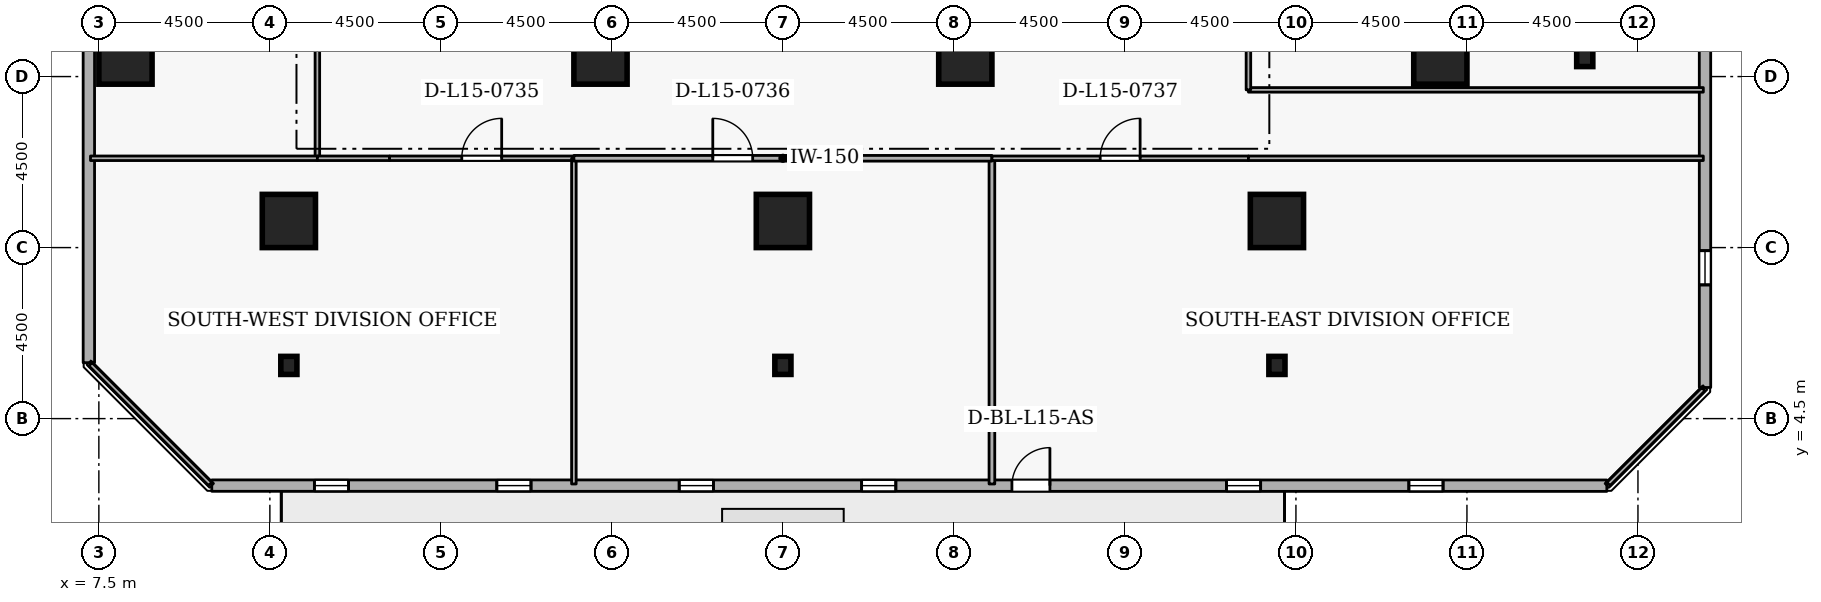
"""IFC4 building model, lengths in metres.
Left out: names, types, materials, properties, quantities, classifications, styles, units other than length and angle.
Written with IfcOpenShell. Run it as: python <this file> out.ifc"""

import sys

from ifc_helpers import new_model, si_unit, direction, frame, frame_2d, origin, origin_2d, place, context, subcontext, project, spatial, rectangle, i_section, extrude, element, fill, save


model = new_model("IFC4")
c1 = context("Model", 3, precision=1e-05, world=origin(), true_north=direction((0.0, 1.0)))
c2 = subcontext(c1, "Body", "Model", "MODEL_VIEW")
j1 = project(units=[si_unit("LENGTHUNIT", "METRE"), si_unit("PLANEANGLEUNIT", "RADIAN")], contexts=[c1])
p1 = place(None, origin())
s1 = spatial("IfcSite", under=j1, at=p1, CompositionType="ELEMENT")
p2 = place(p1, origin())
s2 = spatial("IfcBuilding", under=s1, at=p2, CompositionType="ELEMENT")
p3 = place(p2, frame((0.0, 0.0, 60.9)))
s3 = spatial("IfcBuildingStorey", under=s2, at=p3, CompositionType="ELEMENT", Elevation=60.9)
for number, where, z_axis, x_axis in (
    (1, (12.5, 9.7, 0.0), (0.0, 0.0, 1.0), (1.0, 0.0, 0.0)),
    (2, (25.5, 9.7, 0.0), (0.0, 0.0, 1.0), (1.0, 0.0, 0.0)),
    (3, (38.5, 9.7, 0.0), (0.0, 0.0, 1.0), (1.0, 0.0, 0.0)),
    (4, (42.8, 14.0, 0.0), (0.0, 0.0, 1.0), (1.0, 0.0, 0.0)),
    (5, (8.2, 14.0, 0.0), (0.0, 0.0, 1.0), (1.0, 0.0, 0.0)),
    (6, (20.7, 14.0, 0.0), (0.0, 0.0, 1.0), (1.0, 0.0, 0.0)),
    (7, (30.3, 14.0, 0.0), (0.0, 0.0, 1.0), (1.0, 0.0, 0.0)),
):
    element("IfcColumn", number, at=place(p3, frame(where, z_axis=z_axis, x_axis=x_axis)), inside=s3, PredefinedType="COLUMN", context=c2, shape_type="SweptSolid", body=[
        extrude(rectangle(XDim=1.4, YDim=1.4, at=origin_2d()), origin(), (0.0, 0.0, 1.0), 3.6),
    ])
for number, where, z_axis, x_axis in (
    (8, (12.5, 5.9, 0.0), (0.0, 0.0, 1.0), (1.0, 0.0, 0.0)),
    (9, (25.5, 5.9, 0.0), (0.0, 0.0, 1.0), (1.0, 0.0, 0.0)),
    (10, (38.5, 5.9, 0.0), (0.0, 0.0, 1.0), (1.0, 0.0, 0.0)),
    (11, (46.6, 14.0, 0.0), (0.0, 0.0, 1.0), (1.0, 0.0, 0.0)),
):
    element("IfcColumn", number, at=place(p3, frame(where, z_axis=z_axis, x_axis=x_axis)), inside=s3, PredefinedType="COLUMN", context=c2, shape_type="SweptSolid", body=[
        extrude(i_section(OverallWidth=0.424, OverallDepth=0.475, WebThickness=0.048, FlangeThickness=0.077, FilletRadius=0.015, at=origin_2d()), origin(), (0.0, 0.0, 1.0), 3.6),
    ])
p4 = place(p3, frame((10.471, 2.737, 0.0), z_axis=(0.0, 0.0, 1.0), x_axis=(0.999999998209, -5.985515e-05, 0.0)))
e12 = element("IfcWall", 12, at=p4, inside=s3, PredefinedType="STANDARD", context=c2, shape_type="SweptSolid", body=[
    extrude(rectangle(XDim=36.71, YDim=0.3, at=frame_2d((18.355, 0.0))), origin(), (0.0, 0.0, 1.0), 2.7),
])
p5 = place(p4, frame((21.055, 0.0, 0.0)))
e13 = element("IfcOpeningElement", 13, at=p5, cuts=e12, PredefinedType="OPENING", context=c2, shape_type="SweptSolid", body=[
    extrude(rectangle(XDim=1.0, YDim=2.08, at=frame_2d((0.5, 1.04))), frame((0.0, 0.16, 0.0), z_axis=(0.0, -1.0, 0.0), x_axis=(1.0, 0.0, 0.0)), (0.0, 0.0, 1.0), 0.32),
])
p6 = place(p4, frame((2.7, 0.0, 0.72)))
e14 = element("IfcOpeningElement", 14, at=p6, cuts=e12, PredefinedType="OPENING", context=c2, shape_type="SweptSolid", body=[
    extrude(rectangle(XDim=0.9, YDim=1.75, at=frame_2d((0.45, 0.875))), frame((0.0, 0.16, 0.0), z_axis=(0.0, -1.0, 0.0), x_axis=(1.0, 0.0, 0.0)), (0.0, 0.0, 1.0), 0.32),
])
p7 = place(p4, frame((7.5, 0.0, 0.72)))
e15 = element("IfcOpeningElement", 15, at=p7, cuts=e12, PredefinedType="OPENING", context=c2, shape_type="SweptSolid", body=[
    extrude(rectangle(XDim=0.9, YDim=1.75, at=frame_2d((0.45, 0.875))), frame((0.0, 0.16, 0.0), z_axis=(0.0, -1.0, 0.0), x_axis=(1.0, 0.0, 0.0)), (0.0, 0.0, 1.0), 0.32),
])
p8 = place(p4, frame((12.3, 0.0, 0.72)))
e16 = element("IfcOpeningElement", 16, at=p8, cuts=e12, PredefinedType="OPENING", context=c2, shape_type="SweptSolid", body=[
    extrude(rectangle(XDim=0.9, YDim=1.75, at=frame_2d((0.45, 0.875))), frame((0.0, 0.16, 0.0), z_axis=(0.0, -1.0, 0.0), x_axis=(1.0, 0.0, 0.0)), (0.0, 0.0, 1.0), 0.32),
])
p9 = place(p4, frame((17.1, 0.0, 0.72)))
e17 = element("IfcOpeningElement", 17, at=p9, cuts=e12, PredefinedType="OPENING", context=c2, shape_type="SweptSolid", body=[
    extrude(rectangle(XDim=0.9, YDim=1.75, at=frame_2d((0.45, 0.875))), frame((0.0, 0.16, 0.0), z_axis=(0.0, -1.0, 0.0), x_axis=(1.0, 0.0, 0.0)), (0.0, 0.0, 1.0), 0.32),
])
p10 = place(p4, frame((26.7, 0.0, 0.72)))
e18 = element("IfcOpeningElement", 18, at=p10, cuts=e12, PredefinedType="OPENING", context=c2, shape_type="SweptSolid", body=[
    extrude(rectangle(XDim=0.9, YDim=1.75, at=frame_2d((0.45, 0.875))), frame((0.0, 0.16, 0.0), z_axis=(0.0, -1.0, 0.0), x_axis=(1.0, 0.0, 0.0)), (0.0, 0.0, 1.0), 0.32),
])
p11 = place(p4, frame((31.5, 0.0, 0.72)))
e19 = element("IfcOpeningElement", 19, at=p11, cuts=e12, PredefinedType="OPENING", context=c2, shape_type="SweptSolid", body=[
    extrude(rectangle(XDim=0.9, YDim=1.75, at=frame_2d((0.45, 0.875))), frame((0.0, 0.16, 0.0), z_axis=(0.0, -1.0, 0.0), x_axis=(1.0, 0.0, 0.0)), (0.0, 0.0, 1.0), 0.32),
])
p12 = place(p3, frame((49.765, 5.319, 0.0), z_axis=(0.0, 0.0, 1.0), x_axis=(-5.985515e-05, 0.999999998209, 0.0)))
e20 = element("IfcWall", 20, at=p12, inside=s3, PredefinedType="STANDARD", context=c2, shape_type="SweptSolid", body=[
    extrude(rectangle(XDim=36.71, YDim=0.3, at=frame_2d((18.355, 0.0))), origin(), (0.0, 0.0, 1.0), 2.7),
])
p13 = place(p12, frame((2.7, 0.0, 0.72)))
e21 = element("IfcOpeningElement", 21, at=p13, cuts=e20, PredefinedType="OPENING", context=c2, shape_type="SweptSolid", body=[
    extrude(rectangle(XDim=0.9, YDim=1.75, at=frame_2d((0.45, 0.875))), frame((0.0, 0.16, 0.0), z_axis=(0.0, -1.0, 0.0), x_axis=(1.0, 0.0, 0.0)), (0.0, 0.0, 1.0), 0.32),
])
p14 = place(p12, frame((12.3, 0.0, 0.72)))
e22 = element("IfcOpeningElement", 22, at=p14, cuts=e20, PredefinedType="OPENING", context=c2, shape_type="SweptSolid", body=[
    extrude(rectangle(XDim=0.9, YDim=1.75, at=frame_2d((0.45, 0.875))), frame((0.0, 0.16, 0.0), z_axis=(0.0, -1.0, 0.0), x_axis=(1.0, 0.0, 0.0)), (0.0, 0.0, 1.0), 0.32),
])
p15 = place(p12, frame((17.1, 0.0, 0.72)))
e23 = element("IfcOpeningElement", 23, at=p15, cuts=e20, PredefinedType="OPENING", context=c2, shape_type="SweptSolid", body=[
    extrude(rectangle(XDim=0.9, YDim=1.75, at=frame_2d((0.45, 0.875))), frame((0.0, 0.16, 0.0), z_axis=(0.0, -1.0, 0.0), x_axis=(1.0, 0.0, 0.0)), (0.0, 0.0, 1.0), 0.32),
])
p16 = place(p12, frame((26.7, 0.0, 0.72)))
e24 = element("IfcOpeningElement", 24, at=p16, cuts=e20, PredefinedType="OPENING", context=c2, shape_type="SweptSolid", body=[
    extrude(rectangle(XDim=0.9, YDim=1.75, at=frame_2d((0.45, 0.875))), frame((0.0, 0.16, 0.0), z_axis=(0.0, -1.0, 0.0), x_axis=(1.0, 0.0, 0.0)), (0.0, 0.0, 1.0), 0.32),
])
p17 = place(p12, frame((31.5, 0.0, 0.72)))
e25 = element("IfcOpeningElement", 25, at=p17, cuts=e20, PredefinedType="OPENING", context=c2, shape_type="SweptSolid", body=[
    extrude(rectangle(XDim=0.9, YDim=1.75, at=frame_2d((0.45, 0.875))), frame((0.0, 0.16, 0.0), z_axis=(0.0, -1.0, 0.0), x_axis=(1.0, 0.0, 0.0)), (0.0, 0.0, 1.0), 0.32),
])
p18 = place(p3, frame((7.235, 42.681, 0.0), z_axis=(0.0, 0.0, 1.0), x_axis=(5.985515e-05, -0.999999998209, 0.0)))
e26 = element("IfcWall", 26, at=p18, inside=s3, PredefinedType="STANDARD", context=c2, shape_type="SweptSolid", body=[
    extrude(rectangle(XDim=36.71, YDim=0.3, at=frame_2d((18.355, 0.0))), origin(), (0.0, 0.0, 1.0), 2.7),
])
p19 = place(p18, frame((7.5, 0.0, 0.72)))
e27 = element("IfcOpeningElement", 27, at=p19, cuts=e26, PredefinedType="OPENING", context=c2, shape_type="SweptSolid", body=[
    extrude(rectangle(XDim=0.9, YDim=1.75, at=frame_2d((0.45, 0.875))), frame((0.0, 0.16, 0.0), z_axis=(0.0, -1.0, 0.0), x_axis=(1.0, 0.0, 0.0)), (0.0, 0.0, 1.0), 0.32),
])
p20 = place(p18, frame((17.1, 0.0, 0.72)))
e28 = element("IfcOpeningElement", 28, at=p20, cuts=e26, PredefinedType="OPENING", context=c2, shape_type="SweptSolid", body=[
    extrude(rectangle(XDim=0.9, YDim=1.75, at=frame_2d((0.45, 0.875))), frame((0.0, 0.16, 0.0), z_axis=(0.0, -1.0, 0.0), x_axis=(1.0, 0.0, 0.0)), (0.0, 0.0, 1.0), 0.32),
])
p21 = place(p18, frame((21.9, 0.0, 0.72)))
e29 = element("IfcOpeningElement", 29, at=p21, cuts=e26, PredefinedType="OPENING", context=c2, shape_type="SweptSolid", body=[
    extrude(rectangle(XDim=0.9, YDim=1.75, at=frame_2d((0.45, 0.875))), frame((0.0, 0.16, 0.0), z_axis=(0.0, -1.0, 0.0), x_axis=(1.0, 0.0, 0.0)), (0.0, 0.0, 1.0), 0.32),
])
p22 = place(p18, frame((26.7, 0.0, 0.72)))
e30 = element("IfcOpeningElement", 30, at=p22, cuts=e26, PredefinedType="OPENING", context=c2, shape_type="SweptSolid", body=[
    extrude(rectangle(XDim=0.9, YDim=1.75, at=frame_2d((0.45, 0.875))), frame((0.0, 0.16, 0.0), z_axis=(0.0, -1.0, 0.0), x_axis=(1.0, 0.0, 0.0)), (0.0, 0.0, 1.0), 0.32),
])
p23 = place(p3, frame((13.25, 20.7, 0.0), z_axis=(0.0, 0.0, 1.0), x_axis=(0.0, -1.0, 0.0)))
e31 = element("IfcWall", 31, at=p23, inside=s3, PredefinedType="PARTITIONING", context=c2, shape_type="SweptSolid", body=[
    extrude(rectangle(XDim=9.35, YDim=0.12, at=frame_2d((4.675, 0.0))), origin(), (0.0, 0.0, 1.0), 3.34),
])
p24 = place(p23, frame((4.15, 0.0, 0.0)))
e32 = element("IfcOpeningElement", 32, at=p24, cuts=e31, PredefinedType="OPENING", context=c2, shape_type="SweptSolid", body=[
    extrude(rectangle(XDim=1.05, YDim=2.1, at=frame_2d((0.525, 1.05))), frame((0.0, 0.07, 0.0), z_axis=(0.0, -1.0, 0.0), x_axis=(1.0, 0.0, 0.0)), (0.0, 0.0, 1.0), 0.14),
])
p25 = place(p3, frame((13.25, 11.35, 0.0), z_axis=(0.0, 0.0, 1.0), x_axis=(-1.0, 0.0, 0.0)))
e33 = element("IfcWall", 33, at=p25, inside=s3, PredefinedType="PARTITIONING", context=c2, shape_type="SweptSolid", body=[
    extrude(rectangle(XDim=5.97, YDim=0.12, at=frame_2d((2.985, 0.0))), origin(), (0.0, 0.0, 1.0), 3.34),
])
p26 = place(p3, frame((49.72, 13.15, 0.0), z_axis=(0.0, 0.0, 1.0), x_axis=(-1.0, 0.0, 0.0)))
e34 = element("IfcWall", 34, at=p26, inside=s3, PredefinedType="PARTITIONING", context=c2, shape_type="SweptSolid", body=[
    extrude(rectangle(XDim=11.97, YDim=0.12, at=frame_2d((5.985, 0.0))), origin(), (0.0, 0.0, 1.0), 3.34),
])
p27 = place(p3, frame((37.75, 13.15, 0.0), z_axis=(0.0, 0.0, 1.0), x_axis=(0.0, 1.0, 0.0)))
e35 = element("IfcWall", 35, at=p27, inside=s3, PredefinedType="PARTITIONING", context=c2, shape_type="SweptSolid", body=[
    extrude(rectangle(XDim=1.862, YDim=0.12, at=frame_2d((0.931, 0.0))), origin(), (0.0, 0.0, 1.0), 3.34),
])
p28 = place(p3, frame((13.25, 11.35, 0.0), z_axis=(0.0, 0.0, 1.0), x_axis=(1.0, 0.0, 0.0)))
e36 = element("IfcWall", 36, at=p28, inside=s3, PredefinedType="PARTITIONING", context=c2, shape_type="SweptSolid", body=[
    extrude(rectangle(XDim=1.9, YDim=0.12, at=frame_2d((0.95, 0.0))), origin(), (0.0, 0.0, 1.0), 3.34),
])
p29 = place(p3, frame((15.15, 11.35, 0.0), z_axis=(0.0, 0.0, 1.0), x_axis=(1.0, 0.0, 0.0)))
e37 = element("IfcWall", 37, at=p29, inside=s3, PredefinedType="PARTITIONING", context=c2, shape_type="SweptSolid", body=[
    extrude(rectangle(XDim=4.85, YDim=0.12, at=frame_2d((2.425, 0.0))), origin(), (0.0, 0.0, 1.0), 3.34),
])
p30 = place(p29, frame((1.9, 0.0, 0.0)))
e38 = element("IfcOpeningElement", 38, at=p30, cuts=e37, PredefinedType="OPENING", context=c2, shape_type="SweptSolid", body=[
    extrude(rectangle(XDim=1.05, YDim=2.1, at=frame_2d((0.525, 1.05))), frame((0.0, 0.07, 0.0), z_axis=(0.0, -1.0, 0.0), x_axis=(1.0, 0.0, 0.0)), (0.0, 0.0, 1.0), 0.14),
])
p31 = place(p3, frame((20.0, 11.35, 0.0), z_axis=(0.0, 0.0, 1.0), x_axis=(0.0, -1.0, 0.0)))
e39 = element("IfcWall", 39, at=p31, inside=s3, PredefinedType="PARTITIONING", context=c2, shape_type="SweptSolid", body=[
    extrude(rectangle(XDim=8.57, YDim=0.12, at=frame_2d((4.285, 0.0))), origin(), (0.0, 0.0, 1.0), 3.34),
])
p32 = place(p3, frame((10.43, 2.78, 0.0), z_axis=(0.0, 0.0, 1.0), x_axis=(-0.707106781187, 0.707106781187, 0.0)))
e40 = element("IfcWall", 40, at=p32, inside=s3, PredefinedType="PARTITIONING", context=c2, shape_type="SweptSolid", body=[
    extrude(rectangle(XDim=4.454, YDim=0.12, at=frame_2d((2.227, 0.0))), origin(), (0.0, 0.0, 1.0), 3.34),
])
p33 = place(p3, frame((31.0, 11.35, 0.0), z_axis=(0.0, 0.0, 1.0), x_axis=(0.0, -1.0, 0.0)))
e41 = element("IfcWall", 41, at=p33, inside=s3, PredefinedType="PARTITIONING", context=c2, shape_type="SweptSolid", body=[
    extrude(rectangle(XDim=8.57, YDim=0.15, at=frame_2d((4.285, 0.0))), origin(), (0.0, 0.0, 1.0), 3.34),
])
p34 = place(p3, frame((20.0, 11.35, 0.0), z_axis=(0.0, 0.0, 1.0), x_axis=(1.0, 0.0, 0.0)))
e42 = element("IfcWall", 42, at=p34, inside=s3, PredefinedType="PARTITIONING", context=c2, shape_type="SweptSolid", body=[
    extrude(rectangle(XDim=11.0, YDim=0.15, at=frame_2d((5.5, 0.0))), origin(), (0.0, 0.0, 1.0), 3.34),
])
p35 = place(p34, frame((3.655, 0.0, 0.0)))
e43 = element("IfcOpeningElement", 43, at=p35, cuts=e42, PredefinedType="OPENING", context=c2, shape_type="SweptSolid", body=[
    extrude(rectangle(XDim=1.05, YDim=2.1, at=frame_2d((0.525, 1.05))), frame((0.0, 0.085, 0.0), z_axis=(0.0, -1.0, 0.0), x_axis=(1.0, 0.0, 0.0)), (0.0, 0.0, 1.0), 0.17),
])
p36 = place(p3, frame((31.0, 11.35, 0.0), z_axis=(0.0, 0.0, 1.0), x_axis=(1.0, 0.0, 0.0)))
e44 = element("IfcWall", 44, at=p36, inside=s3, PredefinedType="PARTITIONING", context=c2, shape_type="SweptSolid", body=[
    extrude(rectangle(XDim=6.75, YDim=0.12, at=frame_2d((3.375, 0.0))), origin(), (0.0, 0.0, 1.0), 3.34),
])
p37 = place(p36, frame((2.85, 0.0, 0.0)))
e45 = element("IfcOpeningElement", 45, at=p37, cuts=e44, PredefinedType="OPENING", context=c2, shape_type="SweptSolid", body=[
    extrude(rectangle(XDim=1.05, YDim=2.1, at=frame_2d((0.525, 1.05))), frame((0.0, 0.07, 0.0), z_axis=(0.0, -1.0, 0.0), x_axis=(1.0, 0.0, 0.0)), (0.0, 0.0, 1.0), 0.14),
])
p38 = place(p3, frame((37.75, 11.35, 0.0), z_axis=(0.0, 0.0, 1.0), x_axis=(1.0, 0.0, 0.0)))
e46 = element("IfcWall", 46, at=p38, inside=s3, PredefinedType="PARTITIONING", context=c2, shape_type="SweptSolid", body=[
    extrude(rectangle(XDim=11.97, YDim=0.12, at=frame_2d((5.985, 0.0))), origin(), (0.0, 0.0, 1.0), 3.34),
])
p39 = place(p3, frame((49.72, 5.275, 0.0), z_axis=(0.0, 0.0, 1.0), x_axis=(-0.707106781187, -0.707106781187, 0.0)))
e47 = element("IfcWall", 47, at=p39, inside=s3, PredefinedType="PARTITIONING", context=c2, shape_type="SweptSolid", body=[
    extrude(rectangle(XDim=3.528, YDim=0.12, at=frame_2d((1.764, 0.0))), origin(), (0.0, 0.0, 1.0), 3.34),
])
p40 = place(p5, origin())
e48 = element("IfcDoor", 48, at=p40, inside=s3, OperationType="SINGLE_SWING_RIGHT", PredefinedType="DOOR", context=c2, shape_type="SweptSolid", body=[
    extrude(rectangle(XDim=1.0, YDim=2.08, at=frame_2d((0.5, 1.04))), frame((0.0, 0.025, 0.0), z_axis=(0.0, -1.0, 0.0), x_axis=(1.0, 0.0, 0.0)), (0.0, 0.0, 1.0), 0.05),
])
fill(e13, e48)
p41 = place(p6, origin())
e49 = element("IfcWindow", 49, at=p41, inside=s3, PartitioningType="SINGLE_PANEL", PredefinedType="WINDOW", context=c2, shape_type="SweptSolid", body=[
    extrude(rectangle(XDim=0.9, YDim=1.75, at=frame_2d((0.45, 0.875))), frame((0.0, 0.03, 0.0), z_axis=(0.0, -1.0, 0.0), x_axis=(1.0, 0.0, 0.0)), (0.0, 0.0, 1.0), 0.06),
])
fill(e14, e49)
p42 = place(p7, origin())
e50 = element("IfcWindow", 50, at=p42, inside=s3, PartitioningType="SINGLE_PANEL", PredefinedType="WINDOW", context=c2, shape_type="SweptSolid", body=[
    extrude(rectangle(XDim=0.9, YDim=1.75, at=frame_2d((0.45, 0.875))), frame((0.0, 0.03, 0.0), z_axis=(0.0, -1.0, 0.0), x_axis=(1.0, 0.0, 0.0)), (0.0, 0.0, 1.0), 0.06),
])
fill(e15, e50)
p43 = place(p8, origin())
e51 = element("IfcWindow", 51, at=p43, inside=s3, PartitioningType="SINGLE_PANEL", PredefinedType="WINDOW", context=c2, shape_type="SweptSolid", body=[
    extrude(rectangle(XDim=0.9, YDim=1.75, at=frame_2d((0.45, 0.875))), frame((0.0, 0.03, 0.0), z_axis=(0.0, -1.0, 0.0), x_axis=(1.0, 0.0, 0.0)), (0.0, 0.0, 1.0), 0.06),
])
fill(e16, e51)
p44 = place(p9, origin())
e52 = element("IfcWindow", 52, at=p44, inside=s3, PartitioningType="SINGLE_PANEL", PredefinedType="WINDOW", context=c2, shape_type="SweptSolid", body=[
    extrude(rectangle(XDim=0.9, YDim=1.75, at=frame_2d((0.45, 0.875))), frame((0.0, 0.03, 0.0), z_axis=(0.0, -1.0, 0.0), x_axis=(1.0, 0.0, 0.0)), (0.0, 0.0, 1.0), 0.06),
])
fill(e17, e52)
p45 = place(p10, origin())
e53 = element("IfcWindow", 53, at=p45, inside=s3, PartitioningType="SINGLE_PANEL", PredefinedType="WINDOW", context=c2, shape_type="SweptSolid", body=[
    extrude(rectangle(XDim=0.9, YDim=1.75, at=frame_2d((0.45, 0.875))), frame((0.0, 0.03, 0.0), z_axis=(0.0, -1.0, 0.0), x_axis=(1.0, 0.0, 0.0)), (0.0, 0.0, 1.0), 0.06),
])
fill(e18, e53)
p46 = place(p11, origin())
e54 = element("IfcWindow", 54, at=p46, inside=s3, PartitioningType="SINGLE_PANEL", PredefinedType="WINDOW", context=c2, shape_type="SweptSolid", body=[
    extrude(rectangle(XDim=0.9, YDim=1.75, at=frame_2d((0.45, 0.875))), frame((0.0, 0.03, 0.0), z_axis=(0.0, -1.0, 0.0), x_axis=(1.0, 0.0, 0.0)), (0.0, 0.0, 1.0), 0.06),
])
fill(e19, e54)
p47 = place(p13, origin())
e55 = element("IfcWindow", 55, at=p47, inside=s3, PartitioningType="SINGLE_PANEL", PredefinedType="WINDOW", context=c2, shape_type="SweptSolid", body=[
    extrude(rectangle(XDim=0.9, YDim=1.75, at=frame_2d((0.45, 0.875))), frame((0.0, 0.03, 0.0), z_axis=(0.0, -1.0, 0.0), x_axis=(1.0, 0.0, 0.0)), (0.0, 0.0, 1.0), 0.06),
])
fill(e21, e55)
p48 = place(p30, origin())
e56 = element("IfcDoor", 56, at=p48, inside=s3, OperationType="SINGLE_SWING_RIGHT", PredefinedType="DOOR", context=c2, shape_type="SweptSolid", body=[
    extrude(rectangle(XDim=1.05, YDim=2.1, at=frame_2d((0.525, 1.05))), frame((0.0, 0.025, 0.0), z_axis=(0.0, -1.0, 0.0), x_axis=(1.0, 0.0, 0.0)), (0.0, 0.0, 1.0), 0.05),
])
fill(e38, e56)
p49 = place(p35, origin())
e57 = element("IfcDoor", 57, at=p49, inside=s3, OperationType="SINGLE_SWING_LEFT", PredefinedType="DOOR", context=c2, shape_type="SweptSolid", body=[
    extrude(rectangle(XDim=1.05, YDim=2.1, at=frame_2d((0.525, 1.05))), frame((0.0, 0.025, 0.0), z_axis=(0.0, -1.0, 0.0), x_axis=(1.0, 0.0, 0.0)), (0.0, 0.0, 1.0), 0.05),
])
fill(e43, e57)
p50 = place(p37, origin())
e58 = element("IfcDoor", 58, at=p50, inside=s3, OperationType="SINGLE_SWING_RIGHT", PredefinedType="DOOR", context=c2, shape_type="SweptSolid", body=[
    extrude(rectangle(XDim=1.05, YDim=2.1, at=frame_2d((0.525, 1.05))), frame((0.0, 0.025, 0.0), z_axis=(0.0, -1.0, 0.0), x_axis=(1.0, 0.0, 0.0)), (0.0, 0.0, 1.0), 0.05),
])
fill(e45, e58)
save(model, sys.argv[1])
